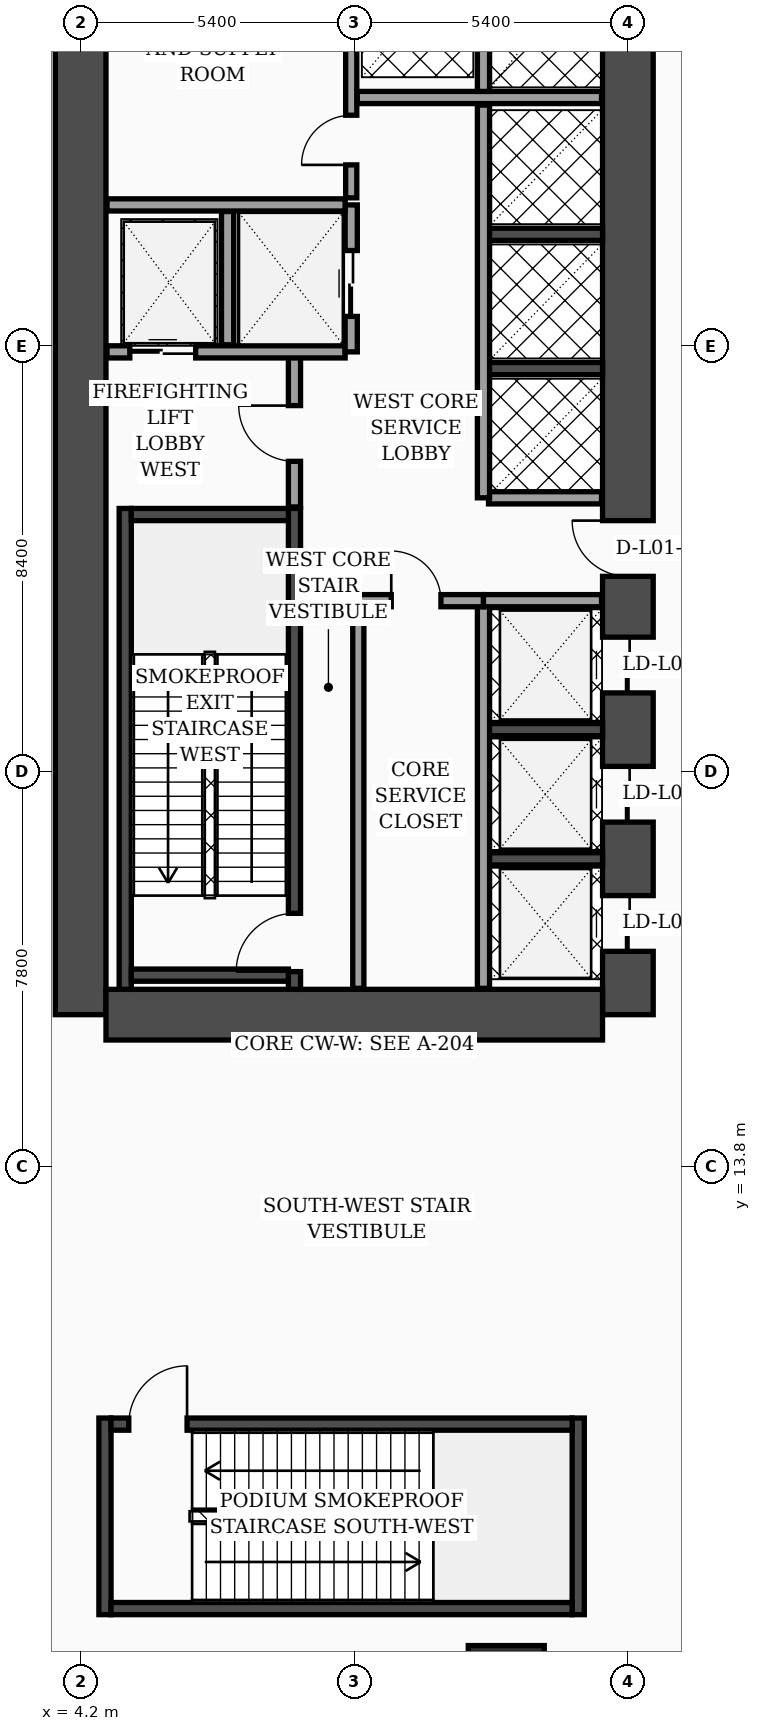
"""IFC4 building model, lengths in metres.
Left out: names, types, materials, properties, quantities, classifications, styles, units other than length and angle.
Written with IfcOpenShell. Run it as: python <this file> out.ifc"""

import sys

from ifc_helpers import new_model, si_unit, direction, frame, frame_2d, origin, origin_2d, place, context, subcontext, project, spatial, rectangle, extrude, element, fill, save


model = new_model("IFC4")
c1 = context("Model", 3, precision=1e-05, world=origin(), true_north=direction((0.0, 1.0)))
c2 = subcontext(c1, "Body", "Model", "MODEL_VIEW")
j1 = project(units=[si_unit("LENGTHUNIT", "METRE"), si_unit("PLANEANGLEUNIT", "RADIAN")], contexts=[c1])
p1 = place(None, origin())
s1 = spatial("IfcSite", under=j1, at=p1, CompositionType="ELEMENT")
p2 = place(p1, origin())
s2 = spatial("IfcBuilding", under=s1, at=p2, CompositionType="ELEMENT")
p3 = place(p2, frame((0.0, 0.0, 6.0)))
s3 = spatial("IfcBuildingStorey", under=s2, at=p3, CompositionType="ELEMENT", Elevation=6.0)
p4 = place(p3, frame((4.2, 16.8, 0.0), z_axis=(0.0, 0.0, 1.0), x_axis=(0.0, 1.0, 0.0)))
e1 = element("IfcWall", 1, at=p4, inside=s3, PredefinedType="SHEAR", context=c2, shape_type="SweptSolid", body=[
    extrude(rectangle(XDim=21.6, YDim=1.0, at=frame_2d((10.8, 0.0))), origin(), (0.0, 0.0, 1.0), 5.68),
])
p5 = place(p3, frame((15.0, 16.8, 0.0), z_axis=(0.0, 0.0, 1.0), x_axis=(0.0, 1.0, 0.0)))
e2 = element("IfcWall", 2, at=p5, inside=s3, PredefinedType="SHEAR", context=c2, shape_type="SweptSolid", body=[
    extrude(rectangle(XDim=21.6, YDim=1.0, at=frame_2d((10.8, 0.0))), origin(), (0.0, 0.0, 1.0), 5.68),
])
p6 = place(p5, frame((8.65, 0.0, 0.0)))
e3 = element("IfcOpeningElement", 3, at=p6, cuts=e2, PredefinedType="OPENING", context=c2, shape_type="SweptSolid", body=[
    extrude(rectangle(XDim=1.1, YDim=2.2, at=frame_2d((0.55, 1.1))), frame((0.0, 0.51, 0.0), z_axis=(0.0, -1.0, 0.0), x_axis=(1.0, 0.0, 0.0)), (0.0, 0.0, 1.0), 1.02),
])
p7 = place(p5, frame((1.25, 0.0, 0.0)))
e4 = element("IfcOpeningElement", 4, at=p7, cuts=e2, PredefinedType="OPENING", context=c2, shape_type="SweptSolid", body=[
    extrude(rectangle(XDim=1.1, YDim=2.2, at=frame_2d((0.55, 1.1))), frame((0.0, 0.51, 0.0), z_axis=(0.0, -1.0, 0.0), x_axis=(1.0, 0.0, 0.0)), (0.0, 0.0, 1.0), 1.02),
])
p8 = place(p5, frame((3.8, 0.0, 0.0)))
e5 = element("IfcOpeningElement", 5, at=p8, cuts=e2, PredefinedType="OPENING", context=c2, shape_type="SweptSolid", body=[
    extrude(rectangle(XDim=1.1, YDim=2.2, at=frame_2d((0.55, 1.1))), frame((0.0, 0.51, 0.0), z_axis=(0.0, -1.0, 0.0), x_axis=(1.0, 0.0, 0.0)), (0.0, 0.0, 1.0), 1.02),
])
p9 = place(p5, frame((6.35, 0.0, 0.0)))
e6 = element("IfcOpeningElement", 6, at=p9, cuts=e2, PredefinedType="OPENING", context=c2, shape_type="SweptSolid", body=[
    extrude(rectangle(XDim=1.1, YDim=2.2, at=frame_2d((0.55, 1.1))), frame((0.0, 0.51, 0.0), z_axis=(0.0, -1.0, 0.0), x_axis=(1.0, 0.0, 0.0)), (0.0, 0.0, 1.0), 1.02),
])
p10 = place(p3, frame((4.7, 16.8, 0.0), z_axis=(0.0, 0.0, 1.0), x_axis=(1.0, 0.0, 0.0)))
e7 = element("IfcWall", 7, at=p10, inside=s3, PredefinedType="SHEAR", context=c2, shape_type="SweptSolid", body=[
    extrude(rectangle(XDim=9.8, YDim=1.0, at=frame_2d((4.9, 0.0))), origin(), (0.0, 0.0, 1.0), 5.68),
])
p11 = place(p3, frame((5.08, 17.3, 0.0), z_axis=(0.0, 0.0, 1.0), x_axis=(0.0, 1.0, 0.0)))
e8 = element("IfcWall", 8, at=p11, inside=s3, PredefinedType="SOLIDWALL", context=c2, shape_type="SweptSolid", body=[
    extrude(rectangle(XDim=9.49, YDim=0.24, at=frame_2d((4.745, 0.0))), origin(), (0.0, 0.0, 1.0), 5.68),
])
p12 = place(p3, frame((8.42, 17.3, 0.0), z_axis=(0.0, 0.0, 1.0), x_axis=(0.0, 1.0, 0.0)))
e9 = element("IfcWall", 9, at=p12, inside=s3, PredefinedType="SOLIDWALL", context=c2, shape_type="SweptSolid", body=[
    extrude(rectangle(XDim=9.49, YDim=0.24, at=frame_2d((4.745, 0.0))), origin(), (0.0, 0.0, 1.0), 5.68),
])
p13 = place(p12, frame((0.35, 0.0, 0.0)))
e10 = element("IfcOpeningElement", 10, at=p13, cuts=e9, PredefinedType="OPENING", context=c2, shape_type="SweptSolid", body=[
    extrude(rectangle(XDim=1.15, YDim=2.2, at=frame_2d((0.575, 1.1))), frame((0.0, 0.13, 0.0), z_axis=(0.0, -1.0, 0.0), x_axis=(1.0, 0.0, 0.0)), (0.0, 0.0, 1.0), 0.26),
])
for number, where, z_axis, x_axis in (
    (11, (5.2, 17.58, 0.0), (0.0, 0.0, 1.0), (1.0, 0.0, 0.0)),
    (12, (5.2, 26.67, 0.0), (0.0, 0.0, 1.0), (1.0, 0.0, 0.0)),
):
    element("IfcWall", number, at=place(p3, frame(where, z_axis=z_axis, x_axis=x_axis)), inside=s3, PredefinedType="SOLIDWALL", context=c2, shape_type="SweptSolid", body=[
        extrude(rectangle(XDim=3.1, YDim=0.24, at=frame_2d((1.55, 0.0))), origin(), (0.0, 0.0, 1.0), 5.68),
    ])
for number, where, z_axis, x_axis in (
    (13, (4.68, 4.96, 0.0), (0.0, 0.0, 1.0), (0.0, 1.0, 0.0)),
    (14, (14.02, 4.96, 0.0), (0.0, 0.0, 1.0), (0.0, 1.0, 0.0)),
):
    element("IfcWall", number, at=place(p3, frame(where, z_axis=z_axis, x_axis=x_axis)), inside=s3, PredefinedType="SOLIDWALL", context=c2, shape_type="SweptSolid", body=[
        extrude(rectangle(XDim=3.88, YDim=0.24, at=frame_2d((1.94, 0.0))), origin(), (0.0, 0.0, 1.0), 5.68),
    ])
p14 = place(p3, frame((4.8, 5.08, 0.0), z_axis=(0.0, 0.0, 1.0), x_axis=(1.0, 0.0, 0.0)))
e15 = element("IfcWall", 15, at=p14, inside=s3, PredefinedType="SOLIDWALL", context=c2, shape_type="SweptSolid", body=[
    extrude(rectangle(XDim=9.1, YDim=0.24, at=frame_2d((4.55, 0.0))), origin(), (0.0, 0.0, 1.0), 5.68),
])
p15 = place(p3, frame((4.8, 8.72, 0.0), z_axis=(0.0, 0.0, 1.0), x_axis=(1.0, 0.0, 0.0)))
e16 = element("IfcWall", 16, at=p15, inside=s3, PredefinedType="SOLIDWALL", context=c2, shape_type="SweptSolid", body=[
    extrude(rectangle(XDim=9.1, YDim=0.24, at=frame_2d((4.55, 0.0))), origin(), (0.0, 0.0, 1.0), 5.68),
])
p16 = place(p15, frame((0.35, 0.0, 0.0)))
e17 = element("IfcOpeningElement", 17, at=p16, cuts=e16, PredefinedType="OPENING", context=c2, shape_type="SweptSolid", body=[
    extrude(rectangle(XDim=1.15, YDim=2.2, at=frame_2d((0.575, 1.1))), frame((0.0, 0.13, 0.0), z_axis=(0.0, -1.0, 0.0), x_axis=(1.0, 0.0, 0.0)), (0.0, 0.0, 1.0), 0.26),
])
for number, where, z_axis, x_axis in (
    (18, (12.18, 19.875, 0.0), (0.0, 0.0, 1.0), (1.0, 0.0, 0.0)),
    (19, (12.18, 22.425, 0.0), (0.0, 0.0, 1.0), (1.0, 0.0, 0.0)),
    (20, (12.18, 29.55, 0.0), (0.0, 0.0, 1.0), (1.0, 0.0, 0.0)),
    (21, (12.18, 32.2, 0.0), (0.0, 0.0, 1.0), (1.0, 0.0, 0.0)),
):
    element("IfcWall", number, at=place(p3, frame(where, z_axis=z_axis, x_axis=x_axis)), inside=s3, PredefinedType="SOLIDWALL", context=c2, shape_type="SweptSolid", body=[
        extrude(rectangle(XDim=2.32, YDim=0.24, at=frame_2d((1.16, 0.0))), origin(), (0.0, 0.0, 1.0), 5.68),
    ])
p17 = place(p3, frame((12.6, 3.6, 0.0), z_axis=(0.0, 0.0, 1.0), x_axis=(1.0, 0.0, 0.0)))
e22 = element("IfcColumn", 22, at=p17, inside=s3, PredefinedType="COLUMN", context=c2, shape_type="SweptSolid", body=[
    extrude(rectangle(XDim=1.5, YDim=1.5, at=origin_2d()), origin(), (0.0, 0.0, 1.0), 5.68),
])
p18 = place(p3, frame((8.42, 26.82, 0.0), z_axis=(0.0, 0.0, 1.0), x_axis=(0.0, 1.0, 0.0)))
e23 = element("IfcWall", 23, at=p18, inside=s3, PredefinedType="SOLIDWALL", context=c2, shape_type="SweptSolid", body=[
    extrude(rectangle(XDim=3.0, YDim=0.24, at=frame_2d((1.5, 0.0))), origin(), (0.0, 0.0, 1.0), 5.68),
])
p19 = place(p18, frame((0.9, 0.0, 0.0)))
e24 = element("IfcOpeningElement", 24, at=p19, cuts=e23, PredefinedType="OPENING", context=c2, shape_type="SweptSolid", body=[
    extrude(rectangle(XDim=1.1, YDim=2.2, at=frame_2d((0.55, 1.1))), frame((0.0, 0.13, 0.0), z_axis=(0.0, -1.0, 0.0), x_axis=(1.0, 0.0, 0.0)), (0.0, 0.0, 1.0), 0.26),
])
p20 = place(p3, frame((4.72, 29.88, 0.0), z_axis=(0.0, 0.0, 1.0), x_axis=(1.0, 0.0, 0.0)))
e25 = element("IfcWall", 25, at=p20, inside=s3, PredefinedType="SOLIDWALL", context=c2, shape_type="SweptSolid", body=[
    extrude(rectangle(XDim=4.7, YDim=0.24, at=frame_2d((2.35, 0.0))), origin(), (0.0, 0.0, 1.0), 5.68),
])
p21 = place(p20, frame((0.45, 0.0, 0.0)))
e26 = element("IfcOpeningElement", 26, at=p21, cuts=e25, PredefinedType="OPENING", context=c2, shape_type="SweptSolid", body=[
    extrude(rectangle(XDim=1.3, YDim=2.35, at=frame_2d((0.65, 1.175))), frame((0.0, 0.13, 0.0), z_axis=(0.0, -1.0, 0.0), x_axis=(1.0, 0.0, 0.0)), (0.0, 0.0, 1.0), 0.26),
])
p22 = place(p3, frame((7.1, 30.02, 0.0), z_axis=(0.0, 0.0, 1.0), x_axis=(0.0, 1.0, 0.0)))
e27 = element("IfcWall", 27, at=p22, inside=s3, PredefinedType="SOLIDWALL", context=c2, shape_type="SweptSolid", body=[
    extrude(rectangle(XDim=2.63, YDim=0.24, at=frame_2d((1.315, 0.0))), origin(), (0.0, 0.0, 1.0), 5.68),
])
p23 = place(p3, frame((9.54, 29.88, 0.0), z_axis=(0.0, 0.0, 1.0), x_axis=(0.0, 1.0, 0.0)))
e28 = element("IfcWall", 28, at=p23, inside=s3, PredefinedType="SOLIDWALL", context=c2, shape_type="SweptSolid", body=[
    extrude(rectangle(XDim=2.9, YDim=0.24, at=frame_2d((1.45, 0.0))), origin(), (0.0, 0.0, 1.0), 5.68),
])
p24 = place(p23, frame((0.7, 0.0, 0.0)))
e29 = element("IfcOpeningElement", 29, at=p24, cuts=e28, PredefinedType="OPENING", context=c2, shape_type="SweptSolid", body=[
    extrude(rectangle(XDim=1.3, YDim=2.35, at=frame_2d((0.65, 1.175))), frame((0.0, 0.13, 0.0), z_axis=(0.0, -1.0, 0.0), x_axis=(1.0, 0.0, 0.0)), (0.0, 0.0, 1.0), 0.26),
])
p25 = place(p3, frame((4.72, 32.78, 0.0), z_axis=(0.0, 0.0, 1.0), x_axis=(1.0, 0.0, 0.0)))
e30 = element("IfcWall", 30, at=p25, inside=s3, PredefinedType="SOLIDWALL", context=c2, shape_type="SweptSolid", body=[
    extrude(rectangle(XDim=4.7, YDim=0.24, at=frame_2d((2.35, 0.0))), origin(), (0.0, 0.0, 1.0), 5.68),
])
p26 = place(p3, frame((9.68, 17.32, 0.0), z_axis=(0.0, 0.0, 1.0), x_axis=(0.0, 1.0, 0.0)))
e31 = element("IfcWall", 31, at=p26, inside=s3, PredefinedType="SOLIDWALL", context=c2, shape_type="SweptSolid", body=[
    extrude(rectangle(XDim=7.68, YDim=0.22, at=frame_2d((3.84, 0.0))), origin(), (0.0, 0.0, 1.0), 5.68),
])
p27 = place(p3, frame((9.54, 32.92, 0.0), z_axis=(0.0, 0.0, 1.0), x_axis=(0.0, 1.0, 0.0)))
e32 = element("IfcWall", 32, at=p27, inside=s3, PredefinedType="SOLIDWALL", context=c2, shape_type="SweptSolid", body=[
    extrude(rectangle(XDim=4.96, YDim=0.22, at=frame_2d((2.48, 0.0))), origin(), (0.0, 0.0, 1.0), 5.68),
])
p28 = place(p27, frame((0.65, 0.0, 0.0)))
e33 = element("IfcOpeningElement", 33, at=p28, cuts=e32, PredefinedType="OPENING", context=c2, shape_type="SweptSolid", body=[
    extrude(rectangle(XDim=0.98, YDim=2.15, at=frame_2d((0.49, 1.075))), frame((0.0, 0.12, 0.0), z_axis=(0.0, -1.0, 0.0), x_axis=(1.0, 0.0, 0.0)), (0.0, 0.0, 1.0), 0.24),
])
p29 = place(p3, frame((12.15, 17.32, 0.0), z_axis=(0.0, 0.0, 1.0), x_axis=(0.0, 1.0, 0.0)))
e34 = element("IfcWall", 34, at=p29, inside=s3, PredefinedType="SOLIDWALL", context=c2, shape_type="SweptSolid", body=[
    extrude(rectangle(XDim=7.65, YDim=0.24, at=frame_2d((3.825, 0.0))), origin(), (0.0, 0.0, 1.0), 5.68),
])
p30 = place(p3, frame((9.68, 24.97, 0.0), z_axis=(0.0, 0.0, 1.0), x_axis=(1.0, 0.0, 0.0)))
e35 = element("IfcWall", 35, at=p30, inside=s3, PredefinedType="SOLIDWALL", context=c2, shape_type="SweptSolid", body=[
    extrude(rectangle(XDim=2.47, YDim=0.24, at=frame_2d((1.235, 0.0))), origin(), (0.0, 0.0, 1.0), 5.68),
])
p31 = place(p30, frame((0.65, 0.0, 0.0)))
e36 = element("IfcOpeningElement", 36, at=p31, cuts=e35, PredefinedType="OPENING", context=c2, shape_type="SweptSolid", body=[
    extrude(rectangle(XDim=0.98, YDim=2.15, at=frame_2d((0.49, 1.075))), frame((0.0, 0.13, 0.0), z_axis=(0.0, -1.0, 0.0), x_axis=(1.0, 0.0, 0.0)), (0.0, 0.0, 1.0), 0.26),
])
p32 = place(p3, frame((12.15, 24.97, 0.0), z_axis=(0.0, 0.0, 1.0), x_axis=(1.0, 0.0, 0.0)))
e37 = element("IfcWall", 37, at=p32, inside=s3, PredefinedType="SOLIDWALL", context=c2, shape_type="SweptSolid", body=[
    extrude(rectangle(XDim=2.33, YDim=0.24, at=frame_2d((1.165, 0.0))), origin(), (0.0, 0.0, 1.0), 4.88),
])
p33 = place(p3, frame((12.25, 27.0, 0.0), z_axis=(0.0, 0.0, 1.0), x_axis=(1.0, 0.0, 0.0)))
e38 = element("IfcWall", 38, at=p33, inside=s3, PredefinedType="SOLIDWALL", context=c2, shape_type="SweptSolid", body=[
    extrude(rectangle(XDim=2.23, YDim=0.24, at=frame_2d((1.115, 0.0))), origin(), (0.0, 0.0, 1.0), 5.68),
])
p34 = place(p3, frame((12.15, 27.0, 0.0), z_axis=(0.0, 0.0, 1.0), x_axis=(0.0, 1.0, 0.0)))
e39 = element("IfcWall", 39, at=p34, inside=s3, PredefinedType="SOLIDWALL", context=c2, shape_type="SweptSolid", body=[
    extrude(rectangle(XDim=7.75, YDim=0.24, at=frame_2d((3.875, 0.0))), origin(), (0.0, 0.0, 1.0), 5.68),
])
p35 = place(p3, frame((9.66, 34.9, 0.0), z_axis=(0.0, 0.0, 1.0), x_axis=(1.0, 0.0, 0.0)))
e40 = element("IfcWall", 40, at=p35, inside=s3, PredefinedType="SOLIDWALL", context=c2, shape_type="SweptSolid", body=[
    extrude(rectangle(XDim=4.82, YDim=0.24, at=frame_2d((2.41, 0.0))), origin(), (0.0, 0.0, 1.0), 5.68),
])
p36 = place(p3, frame((12.15, 35.02, 0.0), z_axis=(0.0, 0.0, 1.0), x_axis=(0.0, 1.0, 0.0)))
e41 = element("IfcWall", 41, at=p36, inside=s3, PredefinedType="SOLIDWALL", context=c2, shape_type="SweptSolid", body=[
    extrude(rectangle(XDim=2.86, YDim=0.24, at=frame_2d((1.43, 0.0))), origin(), (0.0, 0.0, 1.0), 5.68),
])
p37 = place(p19, origin())
e42 = element("IfcDoor", 42, at=p37, inside=s3, OperationType="SINGLE_SWING_RIGHT", PredefinedType="DOOR", context=c2, shape_type="SweptSolid", body=[
    extrude(rectangle(XDim=1.1, YDim=2.2, at=frame_2d((0.55, 1.1))), frame((0.0, 0.025, 0.0), z_axis=(0.0, -1.0, 0.0), x_axis=(1.0, 0.0, 0.0)), (0.0, 0.0, 1.0), 0.05),
])
fill(e24, e42)
p38 = place(p21, origin())
e43 = element("IfcDoor", 43, at=p38, inside=s3, OperationType="DOUBLE_DOOR_SLIDING", PredefinedType="DOOR", context=c2, shape_type="SweptSolid", body=[
    extrude(rectangle(XDim=1.3, YDim=2.35, at=frame_2d((0.65, 1.175))), frame((0.0, 0.025, 0.0), z_axis=(0.0, -1.0, 0.0), x_axis=(1.0, 0.0, 0.0)), (0.0, 0.0, 1.0), 0.05),
])
fill(e26, e43)
p39 = place(p24, origin())
e44 = element("IfcDoor", 44, at=p39, inside=s3, OperationType="DOUBLE_DOOR_SLIDING", PredefinedType="DOOR", context=c2, shape_type="SweptSolid", body=[
    extrude(rectangle(XDim=1.3, YDim=2.35, at=frame_2d((0.65, 1.175))), frame((0.0, 0.025, 0.0), z_axis=(0.0, -1.0, 0.0), x_axis=(1.0, 0.0, 0.0)), (0.0, 0.0, 1.0), 0.05),
])
fill(e29, e44)
p40 = place(p28, origin())
e45 = element("IfcDoor", 45, at=p40, inside=s3, OperationType="SINGLE_SWING_LEFT", PredefinedType="DOOR", context=c2, shape_type="SweptSolid", body=[
    extrude(rectangle(XDim=0.98, YDim=2.15, at=frame_2d((0.49, 1.075))), frame((0.0, 0.025, 0.0), z_axis=(0.0, -1.0, 0.0), x_axis=(1.0, 0.0, 0.0)), (0.0, 0.0, 1.0), 0.05),
])
fill(e33, e45)
p41 = place(p31, origin())
e46 = element("IfcDoor", 46, at=p41, inside=s3, OperationType="SINGLE_SWING_LEFT", PredefinedType="DOOR", context=c2, shape_type="SweptSolid", body=[
    extrude(rectangle(XDim=0.98, YDim=2.15, at=frame_2d((0.49, 1.075))), frame((0.0, 0.025, 0.0), z_axis=(0.0, -1.0, 0.0), x_axis=(1.0, 0.0, 0.0)), (0.0, 0.0, 1.0), 0.05),
])
fill(e36, e46)
p42 = place(p13, origin())
e47 = element("IfcDoor", 47, at=p42, inside=s3, OperationType="SINGLE_SWING_LEFT", PredefinedType="DOOR", context=c2, shape_type="SweptSolid", body=[
    extrude(rectangle(XDim=1.15, YDim=2.2, at=frame_2d((0.575, 1.1))), frame((0.0, 0.025, 0.0), z_axis=(0.0, -1.0, 0.0), x_axis=(1.0, 0.0, 0.0)), (0.0, 0.0, 1.0), 0.05),
])
fill(e10, e47)
p43 = place(p16, origin())
e48 = element("IfcDoor", 48, at=p43, inside=s3, OperationType="SINGLE_SWING_RIGHT", PredefinedType="DOOR", context=c2, shape_type="SweptSolid", body=[
    extrude(rectangle(XDim=1.15, YDim=2.2, at=frame_2d((0.575, 1.1))), frame((0.0, 0.025, 0.0), z_axis=(0.0, -1.0, 0.0), x_axis=(1.0, 0.0, 0.0)), (0.0, 0.0, 1.0), 0.05),
])
fill(e17, e48)
p44 = place(p6, origin())
e49 = element("IfcDoor", 49, at=p44, inside=s3, OperationType="SINGLE_SWING_RIGHT", PredefinedType="DOOR", context=c2, shape_type="SweptSolid", body=[
    extrude(rectangle(XDim=1.1, YDim=2.2, at=frame_2d((0.55, 1.1))), frame((0.0, 0.025, 0.0), z_axis=(0.0, -1.0, 0.0), x_axis=(1.0, 0.0, 0.0)), (0.0, 0.0, 1.0), 0.05),
])
fill(e3, e49)
p45 = place(p7, origin())
e50 = element("IfcDoor", 50, at=p45, inside=s3, OperationType="DOUBLE_DOOR_SLIDING", PredefinedType="DOOR", context=c2, shape_type="SweptSolid", body=[
    extrude(rectangle(XDim=1.1, YDim=2.2, at=frame_2d((0.55, 1.1))), frame((0.0, 0.025, 0.0), z_axis=(0.0, -1.0, 0.0), x_axis=(1.0, 0.0, 0.0)), (0.0, 0.0, 1.0), 0.05),
])
fill(e4, e50)
p46 = place(p8, origin())
e51 = element("IfcDoor", 51, at=p46, inside=s3, OperationType="DOUBLE_DOOR_SLIDING", PredefinedType="DOOR", context=c2, shape_type="SweptSolid", body=[
    extrude(rectangle(XDim=1.1, YDim=2.2, at=frame_2d((0.55, 1.1))), frame((0.0, 0.025, 0.0), z_axis=(0.0, -1.0, 0.0), x_axis=(1.0, 0.0, 0.0)), (0.0, 0.0, 1.0), 0.05),
])
fill(e5, e51)
p47 = place(p9, origin())
e52 = element("IfcDoor", 52, at=p47, inside=s3, OperationType="DOUBLE_DOOR_SLIDING", PredefinedType="DOOR", context=c2, shape_type="SweptSolid", body=[
    extrude(rectangle(XDim=1.1, YDim=2.2, at=frame_2d((0.55, 1.1))), frame((0.0, 0.025, 0.0), z_axis=(0.0, -1.0, 0.0), x_axis=(1.0, 0.0, 0.0)), (0.0, 0.0, 1.0), 0.05),
])
fill(e6, e52)
save(model, sys.argv[1])
